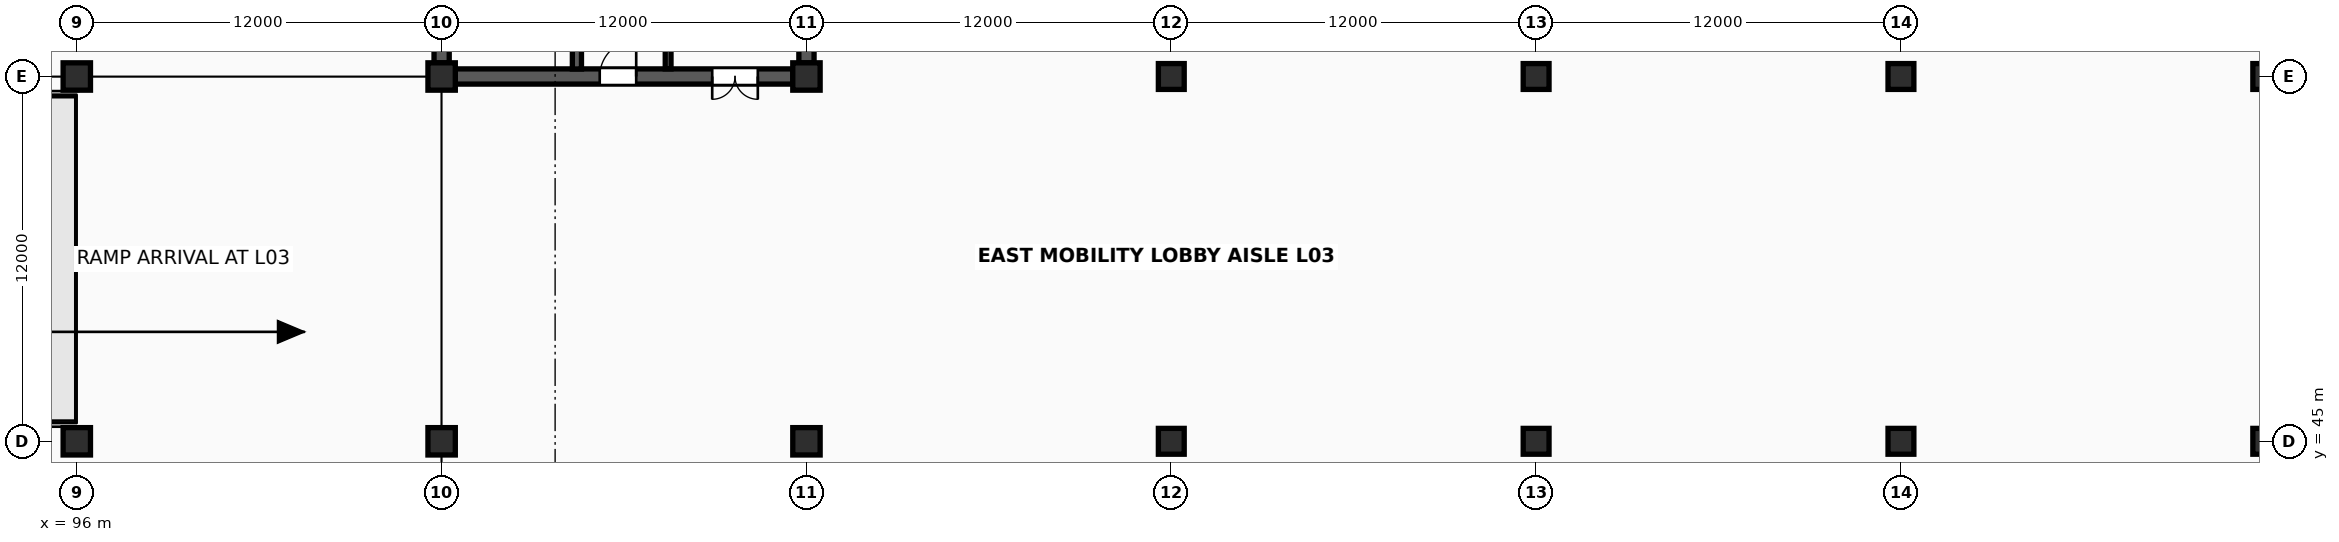
"""IFC4 building model, lengths in metres.
Left out: names, types, materials, properties, quantities, classifications, styles, units other than length and angle.
Written with IfcOpenShell. Run it as: python <this file> out.ifc"""

import sys

from ifc_helpers import new_model, si_unit, direction, frame, frame_2d, origin, origin_2d, place, context, subcontext, project, spatial, rectangle, extrude, element, fill, save


model = new_model("IFC4")
c1 = context("Model", 3, precision=1e-05, world=origin(), true_north=direction((0.0, 1.0)))
c2 = subcontext(c1, "Body", "Model", "MODEL_VIEW")
j1 = project(units=[si_unit("LENGTHUNIT", "METRE"), si_unit("PLANEANGLEUNIT", "RADIAN")], contexts=[c1])
p1 = place(None, origin())
s1 = spatial("IfcSite", under=j1, at=p1, CompositionType="ELEMENT")
p2 = place(p1, origin())
s2 = spatial("IfcBuilding", under=s1, at=p2, CompositionType="ELEMENT")
p3 = place(p2, frame((0.0, 0.0, 13.4)))
s3 = spatial("IfcBuildingStorey", under=s2, at=p3, CompositionType="ELEMENT", Elevation=13.4)
for number, where, z_axis, x_axis in (
    (1, (96.0, 45.0, 0.0), (0.0, 0.0, 1.0), (1.0, 0.0, 0.0)),
    (2, (96.0, 57.0, 0.0), (0.0, 0.0, 1.0), (1.0, 0.0, 0.0)),
    (3, (108.0, 45.0, 0.0), (0.0, 0.0, 1.0), (1.0, 0.0, 0.0)),
    (4, (108.0, 57.0, 0.0), (0.0, 0.0, 1.0), (1.0, 0.0, 0.0)),
    (5, (120.0, 45.0, 0.0), (0.0, 0.0, 1.0), (1.0, 0.0, 0.0)),
    (6, (120.0, 57.0, 0.0), (0.0, 0.0, 1.0), (1.0, 0.0, 0.0)),
):
    element("IfcColumn", number, at=place(p3, frame(where, z_axis=z_axis, x_axis=x_axis)), inside=s3, PredefinedType="COLUMN", context=c2, shape_type="SweptSolid", body=[
        extrude(rectangle(XDim=0.9, YDim=0.9, at=origin_2d()), origin(), (0.0, 0.0, 1.0), 3.8),
    ])
for number, where, z_axis, x_axis in (
    (7, (132.0, 45.0, 0.0), (0.0, 0.0, 1.0), (1.0, 0.0, 0.0)),
    (8, (132.0, 57.0, 0.0), (0.0, 0.0, 1.0), (1.0, 0.0, 0.0)),
    (9, (144.0, 45.0, 0.0), (0.0, 0.0, 1.0), (1.0, 0.0, 0.0)),
    (10, (144.0, 57.0, 0.0), (0.0, 0.0, 1.0), (1.0, 0.0, 0.0)),
    (11, (156.0, 45.0, 0.0), (0.0, 0.0, 1.0), (1.0, 0.0, 0.0)),
    (12, (156.0, 57.0, 0.0), (0.0, 0.0, 1.0), (1.0, 0.0, 0.0)),
    (13, (168.0, 45.0, 0.0), (0.0, 0.0, 1.0), (1.0, 0.0, 0.0)),
    (14, (168.0, 57.0, 0.0), (0.0, 0.0, 1.0), (1.0, 0.0, 0.0)),
):
    element("IfcColumn", number, at=place(p3, frame(where, z_axis=z_axis, x_axis=x_axis)), inside=s3, PredefinedType="COLUMN", context=c2, shape_type="SweptSolid", body=[
        extrude(rectangle(XDim=0.85, YDim=0.85, at=origin_2d()), origin(), (0.0, 0.0, 1.0), 3.8),
    ])
p4 = place(p3, frame((108.447, 57.0, 0.0), z_axis=(0.0, 0.0, 1.0), x_axis=(1.0, 0.0, 0.0)))
e15 = element("IfcWall", 15, at=p4, inside=s3, PredefinedType="SHEAR", context=c2, shape_type="SweptSolid", body=[
    extrude(rectangle(XDim=11.106, YDim=0.5, at=frame_2d((5.553, 0.0))), origin(), (0.0, 0.0, 1.0), 3.618),
])
p5 = place(p4, frame((4.753, 0.0, 0.0)))
e16 = element("IfcOpeningElement", 16, at=p5, cuts=e15, PredefinedType="OPENING", context=c2, shape_type="SweptSolid", body=[
    extrude(rectangle(XDim=1.2, YDim=2.2, at=frame_2d((0.6, 1.1))), frame((0.0, 0.265, 0.0), z_axis=(0.0, -1.0, 0.0), x_axis=(1.0, 0.0, 0.0)), (0.0, 0.0, 1.0), 0.53),
])
p6 = place(p4, frame((8.453, 0.0, 0.0)))
e17 = element("IfcOpeningElement", 17, at=p6, cuts=e15, PredefinedType="OPENING", context=c2, shape_type="SweptSolid", body=[
    extrude(rectangle(XDim=1.5, YDim=2.25, at=frame_2d((0.75, 1.125))), frame((0.0, 0.265, 0.0), z_axis=(0.0, -1.0, 0.0), x_axis=(1.0, 0.0, 0.0)), (0.0, 0.0, 1.0), 0.53),
])
for number, where, z_axis, x_axis in (
    (18, (108.0, 57.447, 0.0), (0.0, 0.0, 1.0), (0.0, 1.0, 0.0)),
    (19, (120.0, 57.447, 0.0), (0.0, 0.0, 1.0), (0.0, 1.0, 0.0)),
):
    element("IfcWall", number, at=place(p3, frame(where, z_axis=z_axis, x_axis=x_axis)), inside=s3, PredefinedType="SHEAR", context=c2, shape_type="SweptSolid", body=[
        extrude(rectangle(XDim=11.106, YDim=0.5, at=frame_2d((5.553, 0.0))), origin(), (0.0, 0.0, 1.0), 3.618),
    ])
p7 = place(p3, frame((112.45, 57.247, 0.0), z_axis=(0.0, 0.0, 1.0), x_axis=(0.0, 1.0, 0.0)))
e20 = element("IfcWall", 20, at=p7, inside=s3, PredefinedType="SHEAR", context=c2, shape_type="SweptSolid", body=[
    extrude(rectangle(XDim=11.506, YDim=0.3, at=frame_2d((5.753, 0.0))), origin(), (0.0, 0.0, 1.0), 3.618),
])
p8 = place(p7, frame((0.9, 0.0, 0.0)))
e21 = element("IfcOpeningElement", 21, at=p8, cuts=e20, PredefinedType="OPENING", context=c2, shape_type="SweptSolid", body=[
    extrude(rectangle(XDim=1.1, YDim=2.2, at=frame_2d((0.55, 1.1))), frame((0.0, 0.165, 0.0), z_axis=(0.0, -1.0, 0.0), x_axis=(1.0, 0.0, 0.0)), (0.0, 0.0, 1.0), 0.33),
])
p9 = place(p3, frame((115.45, 57.25, 0.0), z_axis=(0.0, 0.0, 1.0), x_axis=(0.0, 1.0, 0.0)))
e22 = element("IfcWall", 22, at=p9, inside=s3, PredefinedType="SOLIDWALL", context=c2, shape_type="SweptSolid", body=[
    extrude(rectangle(XDim=8.43, YDim=0.19, at=frame_2d((4.215, 0.0))), origin(), (0.0, 0.0, 1.0), 3.608),
])
p10 = place(p9, frame((3.6, 0.0, 0.0)))
e23 = element("IfcOpeningElement", 23, at=p10, cuts=e22, PredefinedType="OPENING", context=c2, shape_type="SweptSolid", body=[
    extrude(rectangle(XDim=1.04, YDim=2.18, at=frame_2d((0.52, 1.09))), frame((0.0, 0.11, 0.0), z_axis=(0.0, -1.0, 0.0), x_axis=(1.0, 0.0, 0.0)), (0.0, 0.0, 1.0), 0.22),
])
p11 = place(p5, origin())
e24 = element("IfcDoor", 24, at=p11, inside=s3, OperationType="SINGLE_SWING_RIGHT", PredefinedType="DOOR", context=c2, shape_type="SweptSolid", body=[
    extrude(rectangle(XDim=1.2, YDim=2.2, at=frame_2d((0.6, 1.1))), frame((0.0, 0.025, 0.0), z_axis=(0.0, -1.0, 0.0), x_axis=(1.0, 0.0, 0.0)), (0.0, 0.0, 1.0), 0.05),
])
fill(e16, e24)
p12 = place(p6, origin())
e25 = element("IfcDoor", 25, at=p12, inside=s3, OperationType="DOUBLE_DOOR_SINGLE_SWING", PredefinedType="DOOR", context=c2, shape_type="SweptSolid", body=[
    extrude(rectangle(XDim=1.5, YDim=2.25, at=frame_2d((0.75, 1.125))), frame((0.0, 0.025, 0.0), z_axis=(0.0, -1.0, 0.0), x_axis=(1.0, 0.0, 0.0)), (0.0, 0.0, 1.0), 0.05),
])
fill(e17, e25)
save(model, sys.argv[1])
